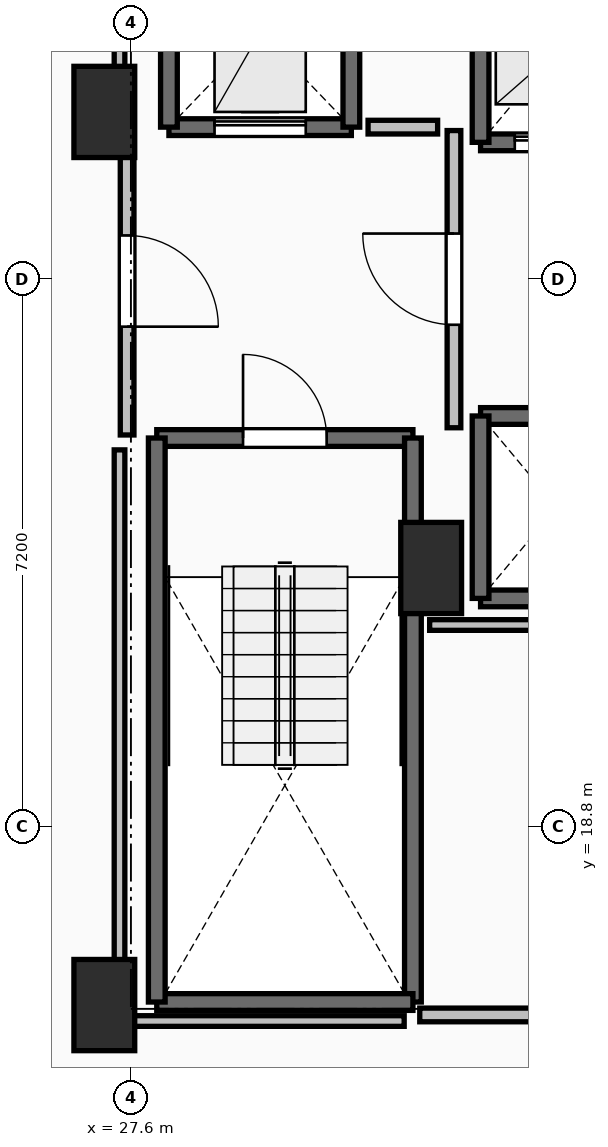
"""IFC4 building model, lengths in metres.
Left out: names, types, materials, properties, quantities, classifications, styles, units other than length and angle.
Written with IfcOpenShell. Run it as: python <this file> out.ifc"""

import sys

from ifc_helpers import new_model, si_unit, direction, frame, frame_2d, origin, origin_2d, place, context, subcontext, project, spatial, rectangle, extrude, element, fill, save


model = new_model("IFC4")
c1 = context("Model", 3, precision=1e-05, world=origin(), true_north=direction((0.0, 1.0)))
c2 = subcontext(c1, "Body", "Model", "MODEL_VIEW")
j1 = project(units=[si_unit("LENGTHUNIT", "METRE"), si_unit("PLANEANGLEUNIT", "RADIAN")], contexts=[c1])
p1 = place(None, origin())
s1 = spatial("IfcSite", under=j1, at=p1, CompositionType="ELEMENT")
p2 = place(p1, origin())
s2 = spatial("IfcBuilding", under=s1, at=p2, CompositionType="ELEMENT")
p3 = place(p2, frame((0.0, 0.0, 110.3)))
s3 = spatial("IfcBuildingStorey", under=s2, at=p3, CompositionType="ELEMENT", Elevation=110.3)
for number, where, z_axis, x_axis in (
    (1, (27.25, 16.45, 0.0), (0.0, 0.0, 1.0), (1.0, 0.0, 0.0)),
    (2, (27.25, 28.2, 0.0), (0.0, 0.0, 1.0), (1.0, 0.0, 0.0)),
    (3, (31.55, 22.2, 0.0), (0.0, 0.0, 1.0), (1.0, 0.0, 0.0)),
):
    element("IfcColumn", number, at=place(p3, frame(where, z_axis=z_axis, x_axis=x_axis)), inside=s3, PredefinedType="PILASTER", context=c2, shape_type="SweptSolid", body=[
        extrude(rectangle(XDim=0.8, YDim=1.2, at=origin_2d()), origin(), (0.0, 0.0, 1.0), 3.5),
    ])
p4 = place(p3, frame((27.94, 23.91, 0.0), z_axis=(0.0, 0.0, 1.0), x_axis=(1.0, 0.0, 0.0)))
e4 = element("IfcWall", 4, at=p4, inside=s3, PredefinedType="SOLIDWALL", context=c2, shape_type="SweptSolid", body=[
    extrude(rectangle(XDim=3.37, YDim=0.22, at=frame_2d((1.685, 0.0))), origin(), (0.0, 0.0, 1.0), 3.24),
])
p5 = place(p4, frame((1.135, 0.0, 0.0)))
e5 = element("IfcOpeningElement", 5, at=p5, cuts=e4, PredefinedType="OPENING", context=c2, shape_type="SweptSolid", body=[
    extrude(rectangle(XDim=1.1, YDim=2.15, at=frame_2d((0.55, 1.075))), frame((0.0, 0.125, 0.0), z_axis=(0.0, -1.0, 0.0), x_axis=(1.0, 0.0, 0.0)), (0.0, 0.0, 1.0), 0.25),
])
p6 = place(p3, frame((31.31, 23.91, 0.0), z_axis=(0.0, 0.0, 1.0), x_axis=(0.0, -1.0, 0.0)))
e6 = element("IfcWall", 6, at=p6, inside=s3, PredefinedType="SOLIDWALL", context=c2, shape_type="SweptSolid", body=[
    extrude(rectangle(XDim=7.42, YDim=0.22, at=frame_2d((3.71, 0.0))), origin(), (0.0, 0.0, 1.0), 3.24),
])
p7 = place(p3, frame((31.31, 16.49, 0.0), z_axis=(0.0, 0.0, 1.0), x_axis=(-1.0, 0.0, 0.0)))
e7 = element("IfcWall", 7, at=p7, inside=s3, PredefinedType="SOLIDWALL", context=c2, shape_type="SweptSolid", body=[
    extrude(rectangle(XDim=3.37, YDim=0.22, at=frame_2d((1.685, 0.0))), origin(), (0.0, 0.0, 1.0), 3.24),
])
p8 = place(p3, frame((27.94, 16.49, 0.0), z_axis=(0.0, 0.0, 1.0), x_axis=(0.0, 1.0, 0.0)))
e8 = element("IfcWall", 8, at=p8, inside=s3, PredefinedType="SOLIDWALL", context=c2, shape_type="SweptSolid", body=[
    extrude(rectangle(XDim=7.42, YDim=0.22, at=frame_2d((3.71, 0.0))), origin(), (0.0, 0.0, 1.0), 3.24),
])
p9 = place(p3, frame((32.2, 27.8, 0.0), z_axis=(0.0, 0.0, 1.0), x_axis=(1.0, 0.0, 0.0)))
e9 = element("IfcWall", 9, at=p9, inside=s3, PredefinedType="SOLIDWALL", context=c2, shape_type="SweptSolid", body=[
    extrude(rectangle(XDim=2.0, YDim=0.22, at=frame_2d((1.0, 0.0))), origin(), (0.0, 0.0, 1.0), 3.24),
])
p10 = place(p9, frame((0.45, 0.0, 0.0)))
e10 = element("IfcOpeningElement", 10, at=p10, cuts=e9, PredefinedType="OPENING", context=c2, shape_type="SweptSolid", body=[
    extrude(rectangle(XDim=1.1, YDim=2.2, at=frame_2d((0.55, 1.1))), frame((0.0, 0.125, 0.0), z_axis=(0.0, -1.0, 0.0), x_axis=(1.0, 0.0, 0.0)), (0.0, 0.0, 1.0), 0.25),
])
p11 = place(p3, frame((32.2, 30.2, 0.0), z_axis=(0.0, 0.0, 1.0), x_axis=(0.0, -1.0, 0.0)))
e11 = element("IfcWall", 11, at=p11, inside=s3, PredefinedType="SOLIDWALL", context=c2, shape_type="SweptSolid", body=[
    extrude(rectangle(XDim=2.4, YDim=0.22, at=frame_2d((1.2, 0.0))), origin(), (0.0, 0.0, 1.0), 3.24),
])
for number, where, z_axis, x_axis in (
    (12, (32.2, 21.8, 0.0), (0.0, 0.0, 1.0), (1.0, 0.0, 0.0)),
    (13, (34.2, 24.2, 0.0), (0.0, 0.0, 1.0), (-1.0, 0.0, 0.0)),
):
    element("IfcWall", number, at=place(p3, frame(where, z_axis=z_axis, x_axis=x_axis)), inside=s3, PredefinedType="SOLIDWALL", context=c2, shape_type="SweptSolid", body=[
        extrude(rectangle(XDim=2.0, YDim=0.22, at=frame_2d((1.0, 0.0))), origin(), (0.0, 0.0, 1.0), 3.24),
    ])
p12 = place(p3, frame((32.2, 24.2, 0.0), z_axis=(0.0, 0.0, 1.0), x_axis=(0.0, -1.0, 0.0)))
e14 = element("IfcWall", 14, at=p12, inside=s3, PredefinedType="SOLIDWALL", context=c2, shape_type="SweptSolid", body=[
    extrude(rectangle(XDim=2.4, YDim=0.22, at=frame_2d((1.2, 0.0))), origin(), (0.0, 0.0, 1.0), 3.24),
])
p13 = place(p3, frame((28.1, 28.0, 0.0), z_axis=(0.0, 0.0, 1.0), x_axis=(1.0, 0.0, 0.0)))
e15 = element("IfcWall", 15, at=p13, inside=s3, PredefinedType="SHEAR", context=c2, shape_type="SweptSolid", body=[
    extrude(rectangle(XDim=2.4, YDim=0.22, at=frame_2d((1.2, 0.0))), origin(), (0.0, 0.0, 1.0), 3.24),
])
p14 = place(p13, frame((0.6, 0.0, 0.0)))
e16 = element("IfcOpeningElement", 16, at=p14, cuts=e15, PredefinedType="OPENING", context=c2, shape_type="SweptSolid", body=[
    extrude(rectangle(XDim=1.2, YDim=2.2, at=frame_2d((0.6, 1.1))), frame((0.0, 0.125, 0.0), z_axis=(0.0, -1.0, 0.0), x_axis=(1.0, 0.0, 0.0)), (0.0, 0.0, 1.0), 0.25),
])
for number, where, z_axis, x_axis in (
    (17, (30.5, 28.0, 0.0), (0.0, 0.0, 1.0), (0.0, 1.0, 0.0)),
    (18, (28.1, 30.5, 0.0), (0.0, 0.0, 1.0), (0.0, -1.0, 0.0)),
):
    element("IfcWall", number, at=place(p3, frame(where, z_axis=z_axis, x_axis=x_axis)), inside=s3, PredefinedType="SHEAR", context=c2, shape_type="SweptSolid", body=[
        extrude(rectangle(XDim=2.5, YDim=0.22, at=frame_2d((1.25, 0.0))), origin(), (0.0, 0.0, 1.0), 3.24),
    ])
p15 = place(p3, frame((31.85, 24.045, 0.0), z_axis=(0.0, 0.0, 1.0), x_axis=(0.0, 1.0, 0.0)))
e19 = element("IfcWall", 19, at=p15, inside=s3, PredefinedType="PARTITIONING", context=c2, shape_type="SweptSolid", body=[
    extrude(rectangle(XDim=3.91, YDim=0.18, at=frame_2d((1.955, 0.0))), origin(), (0.0, 0.0, 1.0), 3.24),
])
p16 = place(p15, frame((1.355, 0.0, 0.0)))
e20 = element("IfcOpeningElement", 20, at=p16, cuts=e19, PredefinedType="OPENING", context=c2, shape_type="SweptSolid", body=[
    extrude(rectangle(XDim=1.2, YDim=2.15, at=frame_2d((0.6, 1.075))), frame((0.0, 0.105, 0.0), z_axis=(0.0, -1.0, 0.0), x_axis=(1.0, 0.0, 0.0)), (0.0, 0.0, 1.0), 0.21),
])
p17 = place(p3, frame((27.55, 28.0, 0.0), z_axis=(0.0, 0.0, 1.0), x_axis=(0.0, -1.0, 0.0)))
e21 = element("IfcWall", 21, at=p17, inside=s3, PredefinedType="PARTITIONING", context=c2, shape_type="SweptSolid", body=[
    extrude(rectangle(XDim=4.05, YDim=0.18, at=frame_2d((2.025, 0.0))), origin(), (0.0, 0.0, 1.0), 3.24),
])
p18 = place(p17, frame((1.425, 0.0, 0.0)))
e22 = element("IfcOpeningElement", 22, at=p18, cuts=e21, PredefinedType="OPENING", context=c2, shape_type="SweptSolid", body=[
    extrude(rectangle(XDim=1.2, YDim=2.15, at=frame_2d((0.6, 1.075))), frame((0.0, 0.105, 0.0), z_axis=(0.0, -1.0, 0.0), x_axis=(1.0, 0.0, 0.0)), (0.0, 0.0, 1.0), 0.21),
])
p19 = place(p3, frame((31.4, 16.32, 0.0), z_axis=(0.0, 0.0, 1.0), x_axis=(1.0, 0.0, 0.0)))
e23 = element("IfcWall", 23, at=p19, inside=s3, PredefinedType="PARTITIONING", context=c2, shape_type="SweptSolid", body=[
    extrude(rectangle(XDim=4.4, YDim=0.18, at=frame_2d((2.2, 0.0))), origin(), (0.0, 0.0, 1.0), 3.24),
])
p20 = place(p19, frame((1.775, 0.0, 0.0)))
e24 = element("IfcOpeningElement", 24, at=p20, cuts=e23, PredefinedType="OPENING", context=c2, shape_type="SweptSolid", body=[
    extrude(rectangle(XDim=0.85, YDim=2.1, at=frame_2d((0.425, 1.05))), frame((0.0, 0.105, 0.0), z_axis=(0.0, -1.0, 0.0), x_axis=(1.0, 0.0, 0.0)), (0.0, 0.0, 1.0), 0.21),
])
p21 = place(p3, frame((31.635, 28.0, 0.0), z_axis=(0.0, 0.0, 1.0), x_axis=(-1.0, 0.0, 0.0)))
e25 = element("IfcWall", 25, at=p21, inside=s3, PredefinedType="PARTITIONING", context=c2, shape_type="SweptSolid", body=[
    extrude(rectangle(XDim=0.915, YDim=0.18, at=frame_2d((0.458, 0.0))), origin(), (0.0, 0.0, 1.0), 3.24),
])
p22 = place(p3, frame((35.58, 21.45, 0.0), z_axis=(0.0, 0.0, 1.0), x_axis=(-1.0, 0.0, 0.0)))
e26 = element("IfcWall", 26, at=p22, inside=s3, PredefinedType="PARTITIONING", context=c2, shape_type="SweptSolid", body=[
    extrude(rectangle(XDim=4.05, YDim=0.14, at=frame_2d((2.025, 0.0))), origin(), (0.0, 0.0, 1.0), 3.24),
])
p23 = place(p3, frame((31.195, 16.24, 0.0), z_axis=(0.0, 0.0, 1.0), x_axis=(-1.0, 0.0, 0.0)))
e27 = element("IfcWall", 27, at=p23, inside=s3, PredefinedType="PARTITIONING", context=c2, shape_type="SweptSolid", body=[
    extrude(rectangle(XDim=3.745, YDim=0.14, at=frame_2d((1.873, 0.0))), origin(), (0.0, 0.0, 1.0), 2.432),
])
p24 = place(p3, frame((27.45, 16.24, 0.0), z_axis=(0.0, 0.0, 1.0), x_axis=(0.0, 1.0, 0.0)))
e28 = element("IfcWall", 28, at=p24, inside=s3, PredefinedType="PARTITIONING", context=c2, shape_type="SweptSolid", body=[
    extrude(rectangle(XDim=7.514, YDim=0.14, at=frame_2d((3.757, 0.0))), origin(), (0.0, 0.0, 1.0), 2.432),
])
p25 = place(p3, frame((27.45, 28.196, 0.0), z_axis=(0.0, 0.0, 1.0), x_axis=(0.0, 1.0, 0.0)))
e29 = element("IfcWall", 29, at=p25, inside=s3, PredefinedType="PARTITIONING", context=c2, shape_type="SweptSolid", body=[
    extrude(rectangle(XDim=5.254, YDim=0.14, at=frame_2d((2.627, 0.0))), origin(), (0.0, 0.0, 1.0), 2.432),
])
p26 = place(p5, origin())
e30 = element("IfcDoor", 30, at=p26, inside=s3, OperationType="SINGLE_SWING_LEFT", PredefinedType="DOOR", context=c2, shape_type="SweptSolid", body=[
    extrude(rectangle(XDim=1.1, YDim=2.15, at=frame_2d((0.55, 1.075))), frame((0.0, 0.025, 0.0), z_axis=(0.0, -1.0, 0.0), x_axis=(1.0, 0.0, 0.0)), (0.0, 0.0, 1.0), 0.05),
])
fill(e5, e30)
p27 = place(p10, origin())
e31 = element("IfcDoor", 31, at=p27, inside=s3, OperationType="SLIDING_TO_LEFT", PredefinedType="DOOR", context=c2, shape_type="SweptSolid", body=[
    extrude(rectangle(XDim=1.1, YDim=2.2, at=frame_2d((0.55, 1.1))), frame((0.0, 0.025, 0.0), z_axis=(0.0, -1.0, 0.0), x_axis=(1.0, 0.0, 0.0)), (0.0, 0.0, 1.0), 0.05),
])
fill(e10, e31)
p28 = place(p14, origin())
e32 = element("IfcDoor", 32, at=p28, inside=s3, OperationType="SLIDING_TO_LEFT", PredefinedType="DOOR", context=c2, shape_type="SweptSolid", body=[
    extrude(rectangle(XDim=1.2, YDim=2.2, at=frame_2d((0.6, 1.1))), frame((0.0, 0.025, 0.0), z_axis=(0.0, -1.0, 0.0), x_axis=(1.0, 0.0, 0.0)), (0.0, 0.0, 1.0), 0.05),
])
fill(e16, e32)
p29 = place(p16, origin())
e33 = element("IfcDoor", 33, at=p29, inside=s3, OperationType="SINGLE_SWING_RIGHT", PredefinedType="DOOR", context=c2, shape_type="SweptSolid", body=[
    extrude(rectangle(XDim=1.2, YDim=2.15, at=frame_2d((0.6, 1.075))), frame((0.0, 0.025, 0.0), z_axis=(0.0, -1.0, 0.0), x_axis=(1.0, 0.0, 0.0)), (0.0, 0.0, 1.0), 0.05),
])
fill(e20, e33)
p30 = place(p18, origin())
e34 = element("IfcDoor", 34, at=p30, inside=s3, OperationType="SINGLE_SWING_RIGHT", PredefinedType="DOOR", context=c2, shape_type="SweptSolid", body=[
    extrude(rectangle(XDim=1.2, YDim=2.15, at=frame_2d((0.6, 1.075))), frame((0.0, 0.025, 0.0), z_axis=(0.0, -1.0, 0.0), x_axis=(1.0, 0.0, 0.0)), (0.0, 0.0, 1.0), 0.05),
])
fill(e22, e34)
save(model, sys.argv[1])
